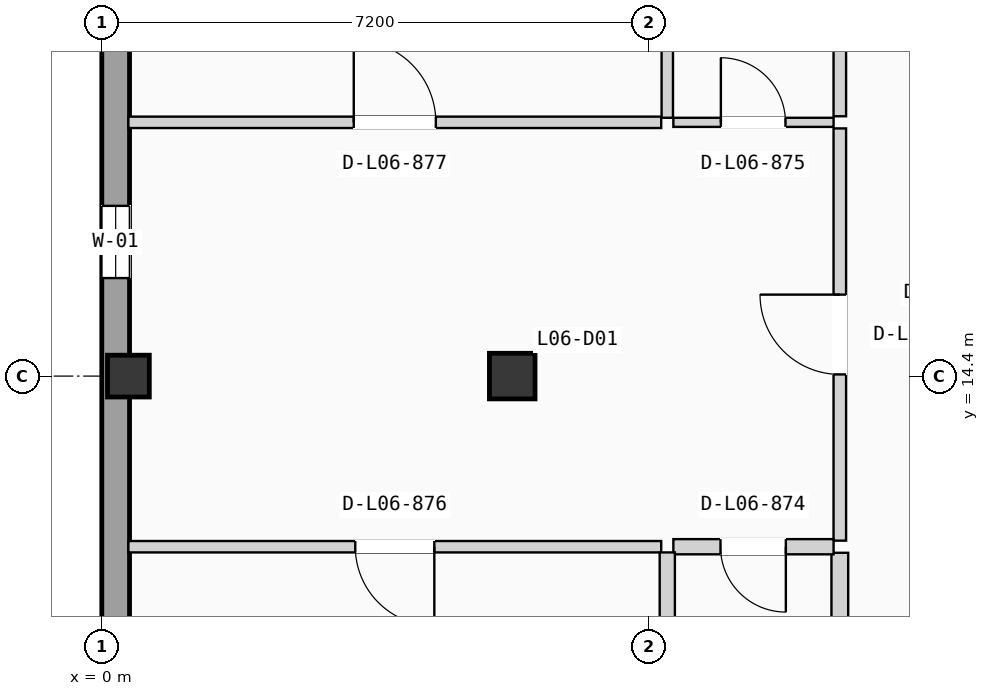
"""IFC4 building model, lengths in metres.
Left out: names, types, materials, properties, quantities, classifications, styles, units other than length and angle.
Written with IfcOpenShell. Run it as: python <this file> out.ifc"""

import sys

from ifc_helpers import new_model, si_unit, direction, frame, frame_2d, origin, origin_2d, place, context, subcontext, project, spatial, rectangle, extrude, element, fill, save


model = new_model("IFC4")
c1 = context("Model", 3, precision=1e-05, world=origin(), true_north=direction((0.0, 1.0)))
c2 = subcontext(c1, "Body", "Model", "MODEL_VIEW")
j1 = project(units=[si_unit("LENGTHUNIT", "METRE"), si_unit("PLANEANGLEUNIT", "RADIAN")], contexts=[c1])
p1 = place(None, origin())
s1 = spatial("IfcSite", under=j1, at=p1, CompositionType="ELEMENT")
p2 = place(p1, origin())
s2 = spatial("IfcBuilding", under=s1, at=p2, CompositionType="ELEMENT")
p3 = place(p2, frame((0.0, 0.0, 21.525)))
s3 = spatial("IfcBuildingStorey", under=s2, at=p3, CompositionType="ELEMENT", Elevation=21.525)
p4 = place(p3, frame((0.35, 14.4, 0.0), z_axis=(0.0, 0.0, 1.0), x_axis=(1.0, 0.0, 0.0)))
e1 = element("IfcColumn", 1, at=p4, inside=s3, PredefinedType="COLUMN", context=c2, shape_type="SweptSolid", body=[
    extrude(rectangle(XDim=0.55, YDim=0.55, at=origin_2d()), origin(), (0.0, 0.0, 1.0), 3.15),
])
p5 = place(p3, frame((5.4, 14.4, 0.0), z_axis=(0.0, 0.0, 1.0), x_axis=(1.0, 0.0, 0.0)))
e2 = element("IfcColumn", 2, at=p5, inside=s3, PredefinedType="COLUMN", context=c2, shape_type="SweptSolid", body=[
    extrude(rectangle(XDim=0.6, YDim=0.6, at=origin_2d()), origin(), (0.0, 0.0, 1.0), 3.15),
])
p6 = place(p3, frame((0.183, 0.365, 0.0), z_axis=(0.0, 0.0, 1.0), x_axis=(0.0, 1.0, 0.0)))
e3 = element("IfcWall", 3, at=p6, inside=s3, PredefinedType="SOLIDWALL", context=c2, shape_type="SweptSolid", body=[
    extrude(rectangle(XDim=49.67, YDim=0.365, at=frame_2d((24.835, 0.0))), origin(), (0.0, 0.0, 1.0), 2.89),
])
p7 = place(p6, frame((15.325, 0.0, 0.85)))
e4 = element("IfcOpeningElement", 4, at=p7, cuts=e3, PredefinedType="OPENING", context=c2, shape_type="SweptSolid", body=[
    extrude(rectangle(XDim=0.95, YDim=1.2, at=frame_2d((0.475, 0.6))), frame((0.0, 0.192, 0.0), z_axis=(0.0, -1.0, 0.0), x_axis=(1.0, 0.0, 0.0)), (0.0, 0.0, 1.0), 0.385),
])
p8 = place(p6, frame((8.897, 0.0, 0.9)))
e5 = element("IfcOpeningElement", 5, at=p8, cuts=e3, PredefinedType="OPENING", context=c2, shape_type="SweptSolid", body=[
    extrude(rectangle(XDim=1.15, YDim=1.2, at=frame_2d((0.575, 0.6))), frame((0.0, 0.192, 0.0), z_axis=(0.0, -1.0, 0.0), x_axis=(1.0, 0.0, 0.0)), (0.0, 0.0, 1.0), 0.385),
])
p9 = place(p6, frame((18.635, 0.0, 0.855)))
e6 = element("IfcOpeningElement", 6, at=p9, cuts=e3, PredefinedType="OPENING", context=c2, shape_type="SweptSolid", body=[
    extrude(rectangle(XDim=1.15, YDim=1.35, at=frame_2d((0.575, 0.675))), frame((0.0, 0.192, 0.0), z_axis=(0.0, -1.0, 0.0), x_axis=(1.0, 0.0, 0.0)), (0.0, 0.0, 1.0), 0.385),
])
p10 = place(p6, frame((31.46, 0.0, 0.705)))
e7 = element("IfcOpeningElement", 7, at=p10, cuts=e3, PredefinedType="OPENING", context=c2, shape_type="SweptSolid", body=[
    extrude(rectangle(XDim=1.15, YDim=1.5, at=frame_2d((0.575, 0.75))), frame((0.0, 0.192, 0.0), z_axis=(0.0, -1.0, 0.0), x_axis=(1.0, 0.0, 0.0)), (0.0, 0.0, 1.0), 0.385),
])
p11 = place(p6, frame((24.562, 0.0, 0.555)))
e8 = element("IfcOpeningElement", 8, at=p11, cuts=e3, PredefinedType="OPENING", context=c2, shape_type="SweptSolid", body=[
    extrude(rectangle(XDim=1.15, YDim=1.65, at=frame_2d((0.575, 0.825))), frame((0.0, 0.192, 0.0), z_axis=(0.0, -1.0, 0.0), x_axis=(1.0, 0.0, 0.0)), (0.0, 0.0, 1.0), 0.385),
])
p12 = place(p6, frame((38.695, 0.0, 0.85)))
e9 = element("IfcOpeningElement", 9, at=p12, cuts=e3, PredefinedType="OPENING", context=c2, shape_type="SweptSolid", body=[
    extrude(rectangle(XDim=0.95, YDim=1.2, at=frame_2d((0.475, 0.6))), frame((0.0, 0.192, 0.0), z_axis=(0.0, -1.0, 0.0), x_axis=(1.0, 0.0, 0.0)), (0.0, 0.0, 1.0), 0.385),
])
p13 = place(p3, frame((9.71, 12.235, 0.0), z_axis=(0.0, 0.0, 1.0), x_axis=(0.0, 1.0, 0.0)))
e10 = element("IfcWall", 10, at=p13, inside=s3, PredefinedType="PARTITIONING", context=c2, shape_type="SweptSolid", body=[
    extrude(rectangle(XDim=5.424, YDim=0.165, at=frame_2d((2.712, 0.0))), origin(), (0.0, 0.0, 1.0), 2.87),
])
p14 = place(p13, frame((2.187, 0.0, 0.0)))
e11 = element("IfcOpeningElement", 11, at=p14, cuts=e10, PredefinedType="OPENING", context=c2, shape_type="SweptSolid", body=[
    extrude(rectangle(XDim=1.05, YDim=2.13, at=frame_2d((0.525, 1.065))), frame((0.0, 0.093, 0.0), z_axis=(0.0, -1.0, 0.0), x_axis=(1.0, 0.0, 0.0)), (0.0, 0.0, 1.0), 0.185),
])
p15 = place(p3, frame((9.71, 7.6, 0.0), z_axis=(0.0, 0.0, 1.0), x_axis=(0.0, 1.0, 0.0)))
e12 = element("IfcWall", 12, at=p15, inside=s3, PredefinedType="PLUMBINGWALL", context=c2, shape_type="SweptSolid", body=[
    extrude(rectangle(XDim=4.475, YDim=0.22, at=frame_2d((2.237, 0.0))), origin(), (0.0, 0.0, 1.0), 2.87),
])
p16 = place(p3, frame((9.71, 17.819, 0.0), z_axis=(0.0, 0.0, 1.0), x_axis=(0.0, 1.0, 0.0)))
e13 = element("IfcWall", 13, at=p16, inside=s3, PredefinedType="PARTITIONING", context=c2, shape_type="SweptSolid", body=[
    extrude(rectangle(XDim=4.475, YDim=0.165, at=frame_2d((2.237, 0.0))), origin(), (0.0, 0.0, 1.0), 2.87),
])
p17 = place(p3, frame((7.52, 12.155, 0.0), z_axis=(0.0, 0.0, 1.0), x_axis=(1.0, 0.0, 0.0)))
e14 = element("IfcWall", 14, at=p17, inside=s3, PredefinedType="PLUMBINGWALL", context=c2, shape_type="SweptSolid", body=[
    extrude(rectangle(XDim=2.108, YDim=0.2, at=frame_2d((1.054, 0.0))), origin(), (0.0, 0.0, 1.0), 2.87),
])
p18 = place(p17, frame((0.62, 0.0, 0.0)))
e15 = element("IfcOpeningElement", 15, at=p18, cuts=e14, PredefinedType="OPENING", context=c2, shape_type="SweptSolid", body=[
    extrude(rectangle(XDim=0.86, YDim=2.0, at=frame_2d((0.43, 1.0))), frame((0.0, 0.11, 0.0), z_axis=(0.0, -1.0, 0.0), x_axis=(1.0, 0.0, 0.0)), (0.0, 0.0, 1.0), 0.22),
])
p19 = place(p3, frame((7.52, 17.739, 0.0), z_axis=(0.0, 0.0, 1.0), x_axis=(1.0, 0.0, 0.0)))
e16 = element("IfcWall", 16, at=p19, inside=s3, PredefinedType="PARTITIONING", context=c2, shape_type="SweptSolid", body=[
    extrude(rectangle(XDim=2.108, YDim=0.12, at=frame_2d((1.054, 0.0))), origin(), (0.0, 0.0, 1.0), 2.87),
])
p20 = place(p19, frame((0.625, 0.0, 0.0)))
e17 = element("IfcOpeningElement", 17, at=p20, cuts=e16, PredefinedType="OPENING", context=c2, shape_type="SweptSolid", body=[
    extrude(rectangle(XDim=0.85, YDim=2.01, at=frame_2d((0.425, 1.005))), frame((0.0, 0.07, 0.0), z_axis=(0.0, -1.0, 0.0), x_axis=(1.0, 0.0, 0.0)), (0.0, 0.0, 1.0), 0.14),
])
p21 = place(p3, frame((0.35, 12.155, 0.0), z_axis=(0.0, 0.0, 1.0), x_axis=(1.0, 0.0, 0.0)))
e18 = element("IfcWall", 18, at=p21, inside=s3, PredefinedType="PARTITIONING", context=c2, shape_type="SweptSolid", body=[
    extrude(rectangle(XDim=7.01, YDim=0.15, at=frame_2d((3.505, 0.0))), origin(), (0.0, 0.0, 1.0), 2.87),
])
p22 = place(p21, frame((2.985, 0.0, 0.0)))
e19 = element("IfcOpeningElement", 19, at=p22, cuts=e18, PredefinedType="OPENING", context=c2, shape_type="SweptSolid", body=[
    extrude(rectangle(XDim=1.04, YDim=2.08, at=frame_2d((0.52, 1.04))), frame((0.0, 0.085, 0.0), z_axis=(0.0, -1.0, 0.0), x_axis=(1.0, 0.0, 0.0)), (0.0, 0.0, 1.0), 0.17),
])
p23 = place(p3, frame((0.35, 17.739, 0.0), z_axis=(0.0, 0.0, 1.0), x_axis=(1.0, 0.0, 0.0)))
e20 = element("IfcWall", 20, at=p23, inside=s3, PredefinedType="PARTITIONING", context=c2, shape_type="SweptSolid", body=[
    extrude(rectangle(XDim=7.01, YDim=0.15, at=frame_2d((3.505, 0.0))), origin(), (0.0, 0.0, 1.0), 2.87),
])
p24 = place(p23, frame((2.965, 0.0, 0.0)))
e21 = element("IfcOpeningElement", 21, at=p24, cuts=e20, PredefinedType="OPENING", context=c2, shape_type="SweptSolid", body=[
    extrude(rectangle(XDim=1.08, YDim=2.1, at=frame_2d((0.54, 1.05))), frame((0.0, 0.085, 0.0), z_axis=(0.0, -1.0, 0.0), x_axis=(1.0, 0.0, 0.0)), (0.0, 0.0, 1.0), 0.17),
])
p25 = place(p3, frame((7.44, 7.6, 0.0), z_axis=(0.0, 0.0, 1.0), x_axis=(0.0, 1.0, 0.0)))
e22 = element("IfcWall", 22, at=p25, inside=s3, PredefinedType="PLUMBINGWALL", context=c2, shape_type="SweptSolid", body=[
    extrude(rectangle(XDim=4.48, YDim=0.2, at=frame_2d((2.24, 0.0))), origin(), (0.0, 0.0, 1.0), 2.87),
])
p26 = place(p3, frame((7.44, 17.799, 0.0), z_axis=(0.0, 0.0, 1.0), x_axis=(0.0, 1.0, 0.0)))
e23 = element("IfcWall", 23, at=p26, inside=s3, PredefinedType="PARTITIONING", context=c2, shape_type="SweptSolid", body=[
    extrude(rectangle(XDim=4.495, YDim=0.15, at=frame_2d((2.248, 0.0))), origin(), (0.0, 0.0, 1.0), 2.87),
])
p27 = place(p7, origin())
e24 = element("IfcWindow", 24, at=p27, inside=s3, PartitioningType="SINGLE_PANEL", PredefinedType="WINDOW", context=c2, shape_type="SweptSolid", body=[
    extrude(rectangle(XDim=0.95, YDim=1.2, at=frame_2d((0.475, 0.6))), frame((0.0, 0.03, 0.0), z_axis=(0.0, -1.0, 0.0), x_axis=(1.0, 0.0, 0.0)), (0.0, 0.0, 1.0), 0.06),
])
fill(e4, e24)
p28 = place(p14, origin())
e25 = element("IfcDoor", 25, at=p28, inside=s3, OperationType="SINGLE_SWING_RIGHT", PredefinedType="DOOR", context=c2, shape_type="SweptSolid", body=[
    extrude(rectangle(XDim=1.05, YDim=2.13, at=frame_2d((0.525, 1.065))), frame((0.0, 0.025, 0.0), z_axis=(0.0, -1.0, 0.0), x_axis=(1.0, 0.0, 0.0)), (0.0, 0.0, 1.0), 0.05),
])
fill(e11, e25)
p29 = place(p18, frame((0.86, 0.0, 0.0), z_axis=(0.0, 0.0, 1.0), x_axis=(-1.0, 0.0, 0.0)))
e26 = element("IfcDoor", 26, at=p29, inside=s3, OperationType="SINGLE_SWING_RIGHT", PredefinedType="DOOR", context=c2, shape_type="SweptSolid", body=[
    extrude(rectangle(XDim=0.86, YDim=2.0, at=frame_2d((0.43, 1.0))), frame((0.0, 0.025, 0.0), z_axis=(0.0, -1.0, 0.0), x_axis=(1.0, 0.0, 0.0)), (0.0, 0.0, 1.0), 0.05),
])
fill(e15, e26)
p30 = place(p20, origin())
e27 = element("IfcDoor", 27, at=p30, inside=s3, OperationType="SINGLE_SWING_LEFT", PredefinedType="DOOR", context=c2, shape_type="SweptSolid", body=[
    extrude(rectangle(XDim=0.85, YDim=2.01, at=frame_2d((0.425, 1.005))), frame((0.0, 0.025, 0.0), z_axis=(0.0, -1.0, 0.0), x_axis=(1.0, 0.0, 0.0)), (0.0, 0.0, 1.0), 0.05),
])
fill(e17, e27)
p31 = place(p22, frame((1.04, 0.0, 0.0), z_axis=(0.0, 0.0, 1.0), x_axis=(-1.0, 0.0, 0.0)))
e28 = element("IfcDoor", 28, at=p31, inside=s3, OperationType="SINGLE_SWING_RIGHT", PredefinedType="DOOR", context=c2, shape_type="SweptSolid", body=[
    extrude(rectangle(XDim=1.04, YDim=2.08, at=frame_2d((0.52, 1.04))), frame((0.0, 0.025, 0.0), z_axis=(0.0, -1.0, 0.0), x_axis=(1.0, 0.0, 0.0)), (0.0, 0.0, 1.0), 0.05),
])
fill(e19, e28)
p32 = place(p24, origin())
e29 = element("IfcDoor", 29, at=p32, inside=s3, OperationType="SINGLE_SWING_LEFT", PredefinedType="DOOR", context=c2, shape_type="SweptSolid", body=[
    extrude(rectangle(XDim=1.08, YDim=2.1, at=frame_2d((0.54, 1.05))), frame((0.0, 0.025, 0.0), z_axis=(0.0, -1.0, 0.0), x_axis=(1.0, 0.0, 0.0)), (0.0, 0.0, 1.0), 0.05),
])
fill(e21, e29)
save(model, sys.argv[1])
